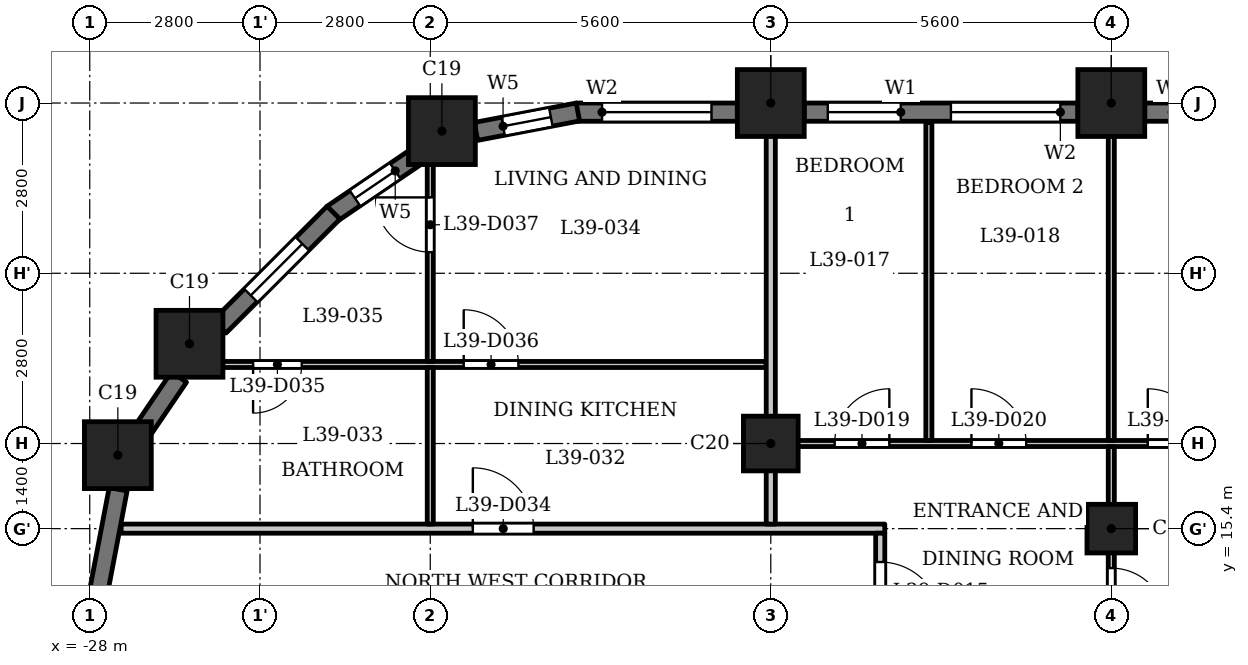
"""IFC4 building model, lengths in metres.
Left out: names, types, materials, properties, quantities, classifications, styles, units other than length and angle.
Written with IfcOpenShell. Run it as: python <this file> out.ifc"""

import sys

from ifc_helpers import new_model, si_unit, direction, frame, frame_2d, origin, origin_2d, place, context, subcontext, project, spatial, rectangle, extrude, element, fill, save


model = new_model("IFC4")
c1 = context("Model", 3, precision=1e-05, world=origin(), true_north=direction((0.0, 1.0)))
c2 = subcontext(c1, "Body", "Model", "MODEL_VIEW")
j1 = project(units=[si_unit("LENGTHUNIT", "METRE"), si_unit("PLANEANGLEUNIT", "RADIAN")], contexts=[c1])
p1 = place(None, origin())
s1 = spatial("IfcSite", under=j1, at=p1, CompositionType="ELEMENT")
p2 = place(p1, origin())
s2 = spatial("IfcBuilding", under=s1, at=p2, CompositionType="ELEMENT")
p3 = place(p2, frame((0.0, 0.0, 153.6)))
s3 = spatial("IfcBuildingStorey", under=s2, at=p3, CompositionType="ELEMENT", Elevation=153.6)
for number, where, z_axis, x_axis in (
    (1, (-11.2, 22.4, 0.0), (0.0, 0.0, 1.0), (1.0, 0.0, 0.0)),
    (2, (-16.8, 22.4, 0.0), (0.0, 0.0, 1.0), (1.0, 0.0, 0.0)),
    (3, (-22.209, 21.938, 0.0), (0.0, 0.0, 1.0), (1.0, 0.0, 0.0)),
    (4, (-26.36, 18.44, 0.0), (0.0, 0.0, 1.0), (1.0, 0.0, 0.0)),
    (5, (-27.538, 16.609, 0.0), (0.0, 0.0, 1.0), (1.0, 0.0, 0.0)),
):
    element("IfcColumn", number, at=place(p3, frame(where, z_axis=z_axis, x_axis=x_axis)), inside=s3, PredefinedType="COLUMN", context=c2, shape_type="SweptSolid", body=[
        extrude(rectangle(XDim=1.1, YDim=1.1, at=origin_2d()), origin(), (0.0, 0.0, 1.0), 3.5),
    ])
p4 = place(p3, frame((-16.8, 16.8, 0.0), z_axis=(0.0, 0.0, 1.0), x_axis=(1.0, 0.0, 0.0)))
e6 = element("IfcColumn", 6, at=p4, inside=s3, PredefinedType="COLUMN", context=c2, shape_type="SweptSolid", body=[
    extrude(rectangle(XDim=0.9, YDim=0.9, at=origin_2d()), origin(), (0.0, 0.0, 1.0), 3.5),
])
p5 = place(p3, frame((-11.2, 15.4, 0.0), z_axis=(0.0, 0.0, 1.0), x_axis=(1.0, 0.0, 0.0)))
e7 = element("IfcColumn", 7, at=p5, inside=s3, PredefinedType="COLUMN", context=c2, shape_type="SweptSolid", body=[
    extrude(rectangle(XDim=0.8, YDim=0.8, at=origin_2d()), origin(), (0.0, 0.0, 1.0), 3.5),
])
p6 = place(p3, frame((-6.15, 22.25, 0.0), z_axis=(0.0, 0.0, 1.0), x_axis=(-1.0, 0.0, 0.0)))
e8 = element("IfcWall", 8, at=p6, inside=s3, PredefinedType="SOLIDWALL", context=c2, shape_type="SweptSolid", body=[
    extrude(rectangle(XDim=4.5, YDim=0.3, at=frame_2d((2.25, 0.0))), origin(), (0.0, 0.0, 1.0), 2.45),
])
p7 = place(p6, frame((0.45, 0.0, 1.2)))
e9 = element("IfcOpeningElement", 9, at=p7, cuts=e8, PredefinedType="OPENING", context=c2, shape_type="SweptSolid", body=[
    extrude(rectangle(XDim=3.6, YDim=0.95, at=frame_2d((1.8, 0.475))), frame((0.0, 0.16, 0.0), z_axis=(0.0, -1.0, 0.0), x_axis=(1.0, 0.0, 0.0)), (0.0, 0.0, 1.0), 0.32),
])
p8 = place(p3, frame((-11.75, 22.25, 0.0), z_axis=(0.0, 0.0, 1.0), x_axis=(-1.0, 0.0, 0.0)))
e10 = element("IfcWall", 10, at=p8, inside=s3, PredefinedType="SOLIDWALL", context=c2, shape_type="SweptSolid", body=[
    extrude(rectangle(XDim=4.5, YDim=0.3, at=frame_2d((2.25, 0.0))), origin(), (0.0, 0.0, 1.0), 2.45),
])
p9 = place(p8, frame((0.288, 0.0, 0.9)))
e11 = element("IfcOpeningElement", 11, at=p9, cuts=e10, PredefinedType="OPENING", context=c2, shape_type="SweptSolid", body=[
    extrude(rectangle(XDim=1.8, YDim=1.25, at=frame_2d((0.9, 0.625))), frame((0.0, 0.16, 0.0), z_axis=(0.0, -1.0, 0.0), x_axis=(1.0, 0.0, 0.0)), (0.0, 0.0, 1.0), 0.32),
])
p10 = place(p8, frame((2.913, 0.0, 0.6)))
e12 = element("IfcOpeningElement", 12, at=p10, cuts=e10, PredefinedType="OPENING", context=c2, shape_type="SweptSolid", body=[
    extrude(rectangle(XDim=1.2, YDim=1.55, at=frame_2d((0.6, 0.775))), frame((0.0, 0.16, 0.0), z_axis=(0.0, -1.0, 0.0), x_axis=(1.0, 0.0, 0.0)), (0.0, 0.0, 1.0), 0.32),
])
p11 = place(p3, frame((-17.35, 22.25, 0.0), z_axis=(0.0, 0.0, 1.0), x_axis=(-1.0, 0.0, 0.0)))
e13 = element("IfcWall", 13, at=p11, inside=s3, PredefinedType="SOLIDWALL", context=c2, shape_type="SweptSolid", body=[
    extrude(rectangle(XDim=2.65, YDim=0.3, at=frame_2d((1.325, 0.0))), origin(), (0.0, 0.0, 1.0), 2.45),
])
p12 = place(p11, frame((0.425, 0.0, 0.9)))
e14 = element("IfcOpeningElement", 14, at=p12, cuts=e13, PredefinedType="OPENING", context=c2, shape_type="SweptSolid", body=[
    extrude(rectangle(XDim=1.8, YDim=1.25, at=frame_2d((0.9, 0.625))), frame((0.0, 0.16, 0.0), z_axis=(0.0, -1.0, 0.0), x_axis=(1.0, 0.0, 0.0)), (0.0, 0.0, 1.0), 0.32),
])
p13 = place(p3, frame((-19.972, 22.253, 0.0), z_axis=(0.0, 0.0, 1.0), x_axis=(-0.982297206936, -0.187329114784, 0.0)))
e15 = element("IfcWall", 15, at=p13, inside=s3, PredefinedType="SOLIDWALL", context=c2, shape_type="SweptSolid", body=[
    extrude(rectangle(XDim=1.706, YDim=0.3, at=frame_2d((0.853, 0.0))), origin(), (0.0, 0.0, 1.0), 2.45),
])
p14 = place(p13, frame((0.453, 0.0, 0.6)))
e16 = element("IfcOpeningElement", 16, at=p14, cuts=e15, PredefinedType="OPENING", context=c2, shape_type="SweptSolid", body=[
    extrude(rectangle(XDim=0.8, YDim=1.55, at=frame_2d((0.4, 0.775))), frame((0.0, 0.16, 0.0), z_axis=(0.0, -1.0, 0.0), x_axis=(1.0, 0.0, 0.0)), (0.0, 0.0, 1.0), 0.32),
])
p15 = place(p3, frame((-22.602, 21.538, 0.0), z_axis=(0.0, 0.0, 1.0), x_axis=(-0.827040942766, -0.562141689424, 0.0)))
e17 = element("IfcWall", 17, at=p15, inside=s3, PredefinedType="SOLIDWALL", context=c2, shape_type="SweptSolid", body=[
    extrude(rectangle(XDim=1.706, YDim=0.3, at=frame_2d((0.853, 0.0))), origin(), (0.0, 0.0, 1.0), 2.45),
])
p16 = place(p15, frame((0.453, 0.0, 0.6)))
e18 = element("IfcOpeningElement", 18, at=p16, cuts=e17, PredefinedType="OPENING", context=c2, shape_type="SweptSolid", body=[
    extrude(rectangle(XDim=0.8, YDim=1.55, at=frame_2d((0.4, 0.775))), frame((0.0, 0.16, 0.0), z_axis=(0.0, -1.0, 0.0), x_axis=(1.0, 0.0, 0.0)), (0.0, 0.0, 1.0), 0.32),
])
p17 = place(p3, frame((-23.991, 20.597, 0.0), z_axis=(0.0, 0.0, 1.0), x_axis=(-0.707106781187, -0.707106781187, 0.0)))
e19 = element("IfcWall", 19, at=p17, inside=s3, PredefinedType="SOLIDWALL", context=c2, shape_type="SweptSolid", body=[
    extrude(rectangle(XDim=2.65, YDim=0.3, at=frame_2d((1.325, 0.0))), origin(), (0.0, 0.0, 1.0), 2.45),
])
p18 = place(p17, frame((0.725, 0.0, 0.6)))
e20 = element("IfcOpeningElement", 20, at=p18, cuts=e19, PredefinedType="OPENING", context=c2, shape_type="SweptSolid", body=[
    extrude(rectangle(XDim=1.2, YDim=1.55, at=frame_2d((0.6, 0.775))), frame((0.0, 0.16, 0.0), z_axis=(0.0, -1.0, 0.0), x_axis=(1.0, 0.0, 0.0)), (0.0, 0.0, 1.0), 0.32),
])
p19 = place(p3, frame((-26.532, 17.893, 0.0), z_axis=(0.0, 0.0, 1.0), x_axis=(-0.562105419172, -0.82706559458, 0.0)))
e21 = element("IfcWall", 21, at=p19, inside=s3, PredefinedType="SOLIDWALL", context=c2, shape_type="SweptSolid", body=[
    extrude(rectangle(XDim=1.077, YDim=0.3, at=frame_2d((0.539, 0.0))), origin(), (0.0, 0.0, 1.0), 3.2),
])
p20 = place(p3, frame((-27.533, 16.048, 0.0), z_axis=(0.0, 0.0, 1.0), x_axis=(-0.187302784601, -0.982302227871, 0.0)))
e22 = element("IfcWall", 22, at=p20, inside=s3, PredefinedType="SOLIDWALL", context=c2, shape_type="SweptSolid", body=[
    extrude(rectangle(XDim=1.706, YDim=0.3, at=frame_2d((0.853, 0.0))), origin(), (0.0, 0.0, 1.0), 2.45),
])
p21 = place(p3, frame((-27.484, 15.4, 0.0), z_axis=(0.0, 0.0, 1.0), x_axis=(1.0, 0.0, 0.0)))
e23 = element("IfcWall", 23, at=p21, inside=s3, PredefinedType="PARTITIONING", context=c2, shape_type="SweptSolid", body=[
    extrude(rectangle(XDim=12.559, YDim=0.15, at=frame_2d((6.279, 0.0))), origin(), (0.0, 0.0, 1.0), 3.2),
])
p22 = place(p21, frame((5.784, 0.0, 0.0)))
e24 = element("IfcOpeningElement", 24, at=p22, cuts=e23, PredefinedType="OPENING", context=c2, shape_type="SweptSolid", body=[
    extrude(rectangle(XDim=1.0, YDim=2.1, at=frame_2d((0.5, 1.05))), frame((0.0, 0.085, 0.0), z_axis=(0.0, -1.0, 0.0), x_axis=(1.0, 0.0, 0.0)), (0.0, 0.0, 1.0), 0.17),
])
p23 = place(p3, frame((-16.725, 16.8, 0.0), z_axis=(0.0, 0.0, 1.0), x_axis=(1.0, 0.0, 0.0)))
e25 = element("IfcWall", 25, at=p23, inside=s3, PredefinedType="PARTITIONING", context=c2, shape_type="SweptSolid", body=[
    extrude(rectangle(XDim=33.45, YDim=0.1, at=frame_2d((16.725, 0.0))), origin(), (0.0, 0.0, 1.0), 3.2),
])
p24 = place(p23, frame((9.575, 0.0, 0.0)))
e26 = element("IfcOpeningElement", 26, at=p24, cuts=e25, PredefinedType="OPENING", context=c2, shape_type="SweptSolid", body=[
    extrude(rectangle(XDim=0.8, YDim=2.1, at=frame_2d((0.4, 1.05))), frame((0.0, 0.06, 0.0), z_axis=(0.0, -1.0, 0.0), x_axis=(1.0, 0.0, 0.0)), (0.0, 0.0, 1.0), 0.12),
])
p25 = place(p23, frame((6.125, 0.0, 0.0)))
e27 = element("IfcOpeningElement", 27, at=p25, cuts=e25, PredefinedType="OPENING", context=c2, shape_type="SweptSolid", body=[
    extrude(rectangle(XDim=0.9, YDim=2.1, at=frame_2d((0.45, 1.05))), frame((0.0, 0.06, 0.0), z_axis=(0.0, -1.0, 0.0), x_axis=(1.0, 0.0, 0.0)), (0.0, 0.0, 1.0), 0.12),
])
p26 = place(p23, frame((0.975, 0.0, 0.0)))
e28 = element("IfcOpeningElement", 28, at=p26, cuts=e25, PredefinedType="OPENING", context=c2, shape_type="SweptSolid", body=[
    extrude(rectangle(XDim=0.9, YDim=2.1, at=frame_2d((0.45, 1.05))), frame((0.0, 0.06, 0.0), z_axis=(0.0, -1.0, 0.0), x_axis=(1.0, 0.0, 0.0)), (0.0, 0.0, 1.0), 0.12),
])
p27 = place(p23, frame((3.225, 0.0, 0.0)))
e29 = element("IfcOpeningElement", 29, at=p27, cuts=e25, PredefinedType="OPENING", context=c2, shape_type="SweptSolid", body=[
    extrude(rectangle(XDim=0.9, YDim=2.1, at=frame_2d((0.45, 1.05))), frame((0.0, 0.06, 0.0), z_axis=(0.0, -1.0, 0.0), x_axis=(1.0, 0.0, 0.0)), (0.0, 0.0, 1.0), 0.12),
])
p28 = place(p23, frame((15.375, 0.0, 0.0)))
e30 = element("IfcOpeningElement", 30, at=p28, cuts=e25, PredefinedType="OPENING", context=c2, shape_type="SweptSolid", body=[
    extrude(rectangle(XDim=0.8, YDim=2.1, at=frame_2d((0.4, 1.05))), frame((0.0, 0.06, 0.0), z_axis=(0.0, -1.0, 0.0), x_axis=(1.0, 0.0, 0.0)), (0.0, 0.0, 1.0), 0.12),
])
p29 = place(p23, frame((13.175, 0.0, 0.0)))
e31 = element("IfcOpeningElement", 31, at=p29, cuts=e25, PredefinedType="OPENING", context=c2, shape_type="SweptSolid", body=[
    extrude(rectangle(XDim=0.9, YDim=2.1, at=frame_2d((0.45, 1.05))), frame((0.0, 0.06, 0.0), z_axis=(0.0, -1.0, 0.0), x_axis=(1.0, 0.0, 0.0)), (0.0, 0.0, 1.0), 0.12),
])
p30 = place(p23, frame((31.975, 0.0, 0.0)))
e32 = element("IfcOpeningElement", 32, at=p30, cuts=e25, PredefinedType="OPENING", context=c2, shape_type="SweptSolid", body=[
    extrude(rectangle(XDim=0.9, YDim=2.1, at=frame_2d((0.45, 1.05))), frame((0.0, 0.06, 0.0), z_axis=(0.0, -1.0, 0.0), x_axis=(1.0, 0.0, 0.0)), (0.0, 0.0, 1.0), 0.12),
])
p31 = place(p23, frame((22.875, 0.0, 0.0)))
e33 = element("IfcOpeningElement", 33, at=p31, cuts=e25, PredefinedType="OPENING", context=c2, shape_type="SweptSolid", body=[
    extrude(rectangle(XDim=0.9, YDim=2.1, at=frame_2d((0.45, 1.05))), frame((0.0, 0.06, 0.0), z_axis=(0.0, -1.0, 0.0), x_axis=(1.0, 0.0, 0.0)), (0.0, 0.0, 1.0), 0.12),
])
p32 = place(p3, frame((-26.44, 18.1, 0.0), z_axis=(0.0, 0.0, 1.0), x_axis=(1.0, 0.0, 0.0)))
e34 = element("IfcWall", 34, at=p32, inside=s3, PredefinedType="PARTITIONING", context=c2, shape_type="SweptSolid", body=[
    extrude(rectangle(XDim=9.565, YDim=0.1, at=frame_2d((4.782, 0.0))), origin(), (0.0, 0.0, 1.0), 3.2),
])
p33 = place(p32, frame((1.126, 0.0, 0.0)))
e35 = element("IfcOpeningElement", 35, at=p33, cuts=e34, PredefinedType="OPENING", context=c2, shape_type="SweptSolid", body=[
    extrude(rectangle(XDim=0.8, YDim=2.1, at=frame_2d((0.4, 1.05))), frame((0.0, 0.06, 0.0), z_axis=(0.0, -1.0, 0.0), x_axis=(1.0, 0.0, 0.0)), (0.0, 0.0, 1.0), 0.12),
])
p34 = place(p32, frame((4.59, 0.0, 0.0)))
e36 = element("IfcOpeningElement", 36, at=p34, cuts=e34, PredefinedType="OPENING", context=c2, shape_type="SweptSolid", body=[
    extrude(rectangle(XDim=0.9, YDim=2.1, at=frame_2d((0.45, 1.05))), frame((0.0, 0.06, 0.0), z_axis=(0.0, -1.0, 0.0), x_axis=(1.0, 0.0, 0.0)), (0.0, 0.0, 1.0), 0.12),
])
p35 = place(p3, frame((-22.4, 15.475, 0.0), z_axis=(0.0, 0.0, 1.0), x_axis=(0.0, 1.0, 0.0)))
e37 = element("IfcWall", 37, at=p35, inside=s3, PredefinedType="PARTITIONING", context=c2, shape_type="SweptSolid", body=[
    extrude(rectangle(XDim=2.575, YDim=0.1, at=frame_2d((1.288, 0.0))), origin(), (0.0, 0.0, 1.0), 3.2),
])
p36 = place(p3, frame((-22.4, 18.15, 0.0), z_axis=(0.0, 0.0, 1.0), x_axis=(0.0, 1.0, 0.0)))
e38 = element("IfcWall", 38, at=p36, inside=s3, PredefinedType="PARTITIONING", context=c2, shape_type="SweptSolid", body=[
    extrude(rectangle(XDim=3.57, YDim=0.1, at=frame_2d((1.785, 0.0))), origin(), (0.0, 0.0, 1.0), 3.2),
])
p37 = place(p36, frame((1.798, 0.0, 0.0)))
e39 = element("IfcOpeningElement", 39, at=p37, cuts=e38, PredefinedType="OPENING", context=c2, shape_type="SweptSolid", body=[
    extrude(rectangle(XDim=0.9, YDim=2.1, at=frame_2d((0.45, 1.05))), frame((0.0, 0.06, 0.0), z_axis=(0.0, -1.0, 0.0), x_axis=(1.0, 0.0, 0.0)), (0.0, 0.0, 1.0), 0.12),
])
p38 = place(p3, frame((-16.8, 15.475, 0.0), z_axis=(0.0, 0.0, 1.0), x_axis=(0.0, 1.0, 0.0)))
e40 = element("IfcWall", 40, at=p38, inside=s3, PredefinedType="PARTITIONING", context=c2, shape_type="SweptSolid", body=[
    extrude(rectangle(XDim=7.455, YDim=0.15, at=frame_2d((3.728, 0.0))), origin(), (0.0, 0.0, 1.0), 3.2),
])
p39 = place(p3, frame((-15.0, 13.275, 0.0), z_axis=(0.0, 0.0, 1.0), x_axis=(0.0, 1.0, 0.0)))
e41 = element("IfcWall", 41, at=p39, inside=s3, PredefinedType="PARTITIONING", context=c2, shape_type="SweptSolid", body=[
    extrude(rectangle(XDim=2.05, YDim=0.15, at=frame_2d((1.025, 0.0))), origin(), (0.0, 0.0, 1.0), 3.2),
])
p40 = place(p39, frame((0.576, 0.0, 0.0)))
e42 = element("IfcOpeningElement", 42, at=p40, cuts=e41, PredefinedType="OPENING", context=c2, shape_type="SweptSolid", body=[
    extrude(rectangle(XDim=1.0, YDim=2.1, at=frame_2d((0.5, 1.05))), frame((0.0, 0.085, 0.0), z_axis=(0.0, -1.0, 0.0), x_axis=(1.0, 0.0, 0.0)), (0.0, 0.0, 1.0), 0.17),
])
p41 = place(p3, frame((-14.2, 16.85, 0.0), z_axis=(0.0, 0.0, 1.0), x_axis=(0.0, 1.0, 0.0)))
e43 = element("IfcWall", 43, at=p41, inside=s3, PredefinedType="PARTITIONING", context=c2, shape_type="SweptSolid", body=[
    extrude(rectangle(XDim=5.23, YDim=0.1, at=frame_2d((2.615, 0.0))), origin(), (0.0, 0.0, 1.0), 3.2),
])
p42 = place(p3, frame((-11.2, 13.275, 0.0), z_axis=(0.0, 0.0, 1.0), x_axis=(0.0, 1.0, 0.0)))
e44 = element("IfcWall", 44, at=p42, inside=s3, PredefinedType="PARTITIONING", context=c2, shape_type="SweptSolid", body=[
    extrude(rectangle(XDim=3.475, YDim=0.1, at=frame_2d((1.738, 0.0))), origin(), (0.0, 0.0, 1.0), 3.2),
])
p43 = place(p42, frame((0.576, 0.0, 0.0)))
e45 = element("IfcOpeningElement", 45, at=p43, cuts=e44, PredefinedType="OPENING", context=c2, shape_type="SweptSolid", body=[
    extrude(rectangle(XDim=0.9, YDim=2.1, at=frame_2d((0.45, 1.05))), frame((0.0, 0.06, 0.0), z_axis=(0.0, -1.0, 0.0), x_axis=(1.0, 0.0, 0.0)), (0.0, 0.0, 1.0), 0.12),
])
p44 = place(p3, frame((-11.2, 16.85, 0.0), z_axis=(0.0, 0.0, 1.0), x_axis=(0.0, 1.0, 0.0)))
e46 = element("IfcWall", 46, at=p44, inside=s3, PredefinedType="PARTITIONING", context=c2, shape_type="SweptSolid", body=[
    extrude(rectangle(XDim=6.08, YDim=0.1, at=frame_2d((3.04, 0.0))), origin(), (0.0, 0.0, 1.0), 3.2),
])
p45 = place(p40, origin())
e47 = element("IfcDoor", 47, at=p45, inside=s3, OperationType="SINGLE_SWING_LEFT", PredefinedType="DOOR", context=c2, shape_type="SweptSolid", body=[
    extrude(rectangle(XDim=1.0, YDim=2.1, at=frame_2d((0.5, 1.05))), frame((0.0, 0.025, 0.0), z_axis=(0.0, -1.0, 0.0), x_axis=(1.0, 0.0, 0.0)), (0.0, 0.0, 1.0), 0.05),
])
fill(e42, e47)
p46 = place(p43, origin())
e48 = element("IfcDoor", 48, at=p46, inside=s3, OperationType="SINGLE_SWING_LEFT", PredefinedType="DOOR", context=c2, shape_type="SweptSolid", body=[
    extrude(rectangle(XDim=0.9, YDim=2.1, at=frame_2d((0.45, 1.05))), frame((0.0, 0.025, 0.0), z_axis=(0.0, -1.0, 0.0), x_axis=(1.0, 0.0, 0.0)), (0.0, 0.0, 1.0), 0.05),
])
fill(e45, e48)
p47 = place(p25, origin())
e49 = element("IfcDoor", 49, at=p47, inside=s3, OperationType="SINGLE_SWING_RIGHT", PredefinedType="DOOR", context=c2, shape_type="SweptSolid", body=[
    extrude(rectangle(XDim=0.9, YDim=2.1, at=frame_2d((0.45, 1.05))), frame((0.0, 0.025, 0.0), z_axis=(0.0, -1.0, 0.0), x_axis=(1.0, 0.0, 0.0)), (0.0, 0.0, 1.0), 0.05),
])
fill(e27, e49)
p48 = place(p26, origin())
e50 = element("IfcDoor", 50, at=p48, inside=s3, OperationType="SINGLE_SWING_LEFT", PredefinedType="DOOR", context=c2, shape_type="SweptSolid", body=[
    extrude(rectangle(XDim=0.9, YDim=2.1, at=frame_2d((0.45, 1.05))), frame((0.0, 0.025, 0.0), z_axis=(0.0, -1.0, 0.0), x_axis=(1.0, 0.0, 0.0)), (0.0, 0.0, 1.0), 0.05),
])
fill(e28, e50)
p49 = place(p27, origin())
e51 = element("IfcDoor", 51, at=p49, inside=s3, OperationType="SINGLE_SWING_RIGHT", PredefinedType="DOOR", context=c2, shape_type="SweptSolid", body=[
    extrude(rectangle(XDim=0.9, YDim=2.1, at=frame_2d((0.45, 1.05))), frame((0.0, 0.025, 0.0), z_axis=(0.0, -1.0, 0.0), x_axis=(1.0, 0.0, 0.0)), (0.0, 0.0, 1.0), 0.05),
])
fill(e29, e51)
p50 = place(p22, origin())
e52 = element("IfcDoor", 52, at=p50, inside=s3, OperationType="SINGLE_SWING_RIGHT", PredefinedType="DOOR", context=c2, shape_type="SweptSolid", body=[
    extrude(rectangle(XDim=1.0, YDim=2.1, at=frame_2d((0.5, 1.05))), frame((0.0, 0.025, 0.0), z_axis=(0.0, -1.0, 0.0), x_axis=(1.0, 0.0, 0.0)), (0.0, 0.0, 1.0), 0.05),
])
fill(e24, e52)
p51 = place(p33, origin())
e53 = element("IfcDoor", 53, at=p51, inside=s3, OperationType="SINGLE_SWING_LEFT", PredefinedType="DOOR", context=c2, shape_type="SweptSolid", body=[
    extrude(rectangle(XDim=0.8, YDim=2.1, at=frame_2d((0.4, 1.05))), frame((0.0, 0.025, 0.0), z_axis=(0.0, -1.0, 0.0), x_axis=(1.0, 0.0, 0.0)), (0.0, 0.0, 1.0), 0.05),
])
fill(e35, e53)
p52 = place(p34, origin())
e54 = element("IfcDoor", 54, at=p52, inside=s3, OperationType="SINGLE_SWING_RIGHT", PredefinedType="DOOR", context=c2, shape_type="SweptSolid", body=[
    extrude(rectangle(XDim=0.9, YDim=2.1, at=frame_2d((0.45, 1.05))), frame((0.0, 0.025, 0.0), z_axis=(0.0, -1.0, 0.0), x_axis=(1.0, 0.0, 0.0)), (0.0, 0.0, 1.0), 0.05),
])
fill(e36, e54)
p53 = place(p37, origin())
e55 = element("IfcDoor", 55, at=p53, inside=s3, OperationType="SINGLE_SWING_LEFT", PredefinedType="DOOR", context=c2, shape_type="SweptSolid", body=[
    extrude(rectangle(XDim=0.9, YDim=2.1, at=frame_2d((0.45, 1.05))), frame((0.0, 0.025, 0.0), z_axis=(0.0, -1.0, 0.0), x_axis=(1.0, 0.0, 0.0)), (0.0, 0.0, 1.0), 0.05),
])
fill(e39, e55)
p54 = place(p9, origin())
e56 = element("IfcWindow", 56, at=p54, inside=s3, PartitioningType="SINGLE_PANEL", PredefinedType="WINDOW", context=c2, shape_type="SweptSolid", body=[
    extrude(rectangle(XDim=1.8, YDim=1.25, at=frame_2d((0.9, 0.625))), frame((0.0, 0.03, 0.0), z_axis=(0.0, -1.0, 0.0), x_axis=(1.0, 0.0, 0.0)), (0.0, 0.0, 1.0), 0.06),
])
fill(e11, e56)
p55 = place(p10, origin())
e57 = element("IfcWindow", 57, at=p55, inside=s3, PartitioningType="SINGLE_PANEL", PredefinedType="WINDOW", context=c2, shape_type="SweptSolid", body=[
    extrude(rectangle(XDim=1.2, YDim=1.55, at=frame_2d((0.6, 0.775))), frame((0.0, 0.03, 0.0), z_axis=(0.0, -1.0, 0.0), x_axis=(1.0, 0.0, 0.0)), (0.0, 0.0, 1.0), 0.06),
])
fill(e12, e57)
p56 = place(p12, origin())
e58 = element("IfcWindow", 58, at=p56, inside=s3, PartitioningType="SINGLE_PANEL", PredefinedType="WINDOW", context=c2, shape_type="SweptSolid", body=[
    extrude(rectangle(XDim=1.8, YDim=1.25, at=frame_2d((0.9, 0.625))), frame((0.0, 0.03, 0.0), z_axis=(0.0, -1.0, 0.0), x_axis=(1.0, 0.0, 0.0)), (0.0, 0.0, 1.0), 0.06),
])
fill(e14, e58)
p57 = place(p14, origin())
e59 = element("IfcWindow", 59, at=p57, inside=s3, PartitioningType="SINGLE_PANEL", PredefinedType="WINDOW", context=c2, shape_type="SweptSolid", body=[
    extrude(rectangle(XDim=0.8, YDim=1.55, at=frame_2d((0.4, 0.775))), frame((0.0, 0.03, 0.0), z_axis=(0.0, -1.0, 0.0), x_axis=(1.0, 0.0, 0.0)), (0.0, 0.0, 1.0), 0.06),
])
fill(e16, e59)
p58 = place(p16, origin())
e60 = element("IfcWindow", 60, at=p58, inside=s3, PartitioningType="SINGLE_PANEL", PredefinedType="WINDOW", context=c2, shape_type="SweptSolid", body=[
    extrude(rectangle(XDim=0.8, YDim=1.55, at=frame_2d((0.4, 0.775))), frame((0.0, 0.03, 0.0), z_axis=(0.0, -1.0, 0.0), x_axis=(1.0, 0.0, 0.0)), (0.0, 0.0, 1.0), 0.06),
])
fill(e18, e60)
p59 = place(p18, origin())
e61 = element("IfcWindow", 61, at=p59, inside=s3, PartitioningType="SINGLE_PANEL", PredefinedType="WINDOW", context=c2, shape_type="SweptSolid", body=[
    extrude(rectangle(XDim=1.2, YDim=1.55, at=frame_2d((0.6, 0.775))), frame((0.0, 0.03, 0.0), z_axis=(0.0, -1.0, 0.0), x_axis=(1.0, 0.0, 0.0)), (0.0, 0.0, 1.0), 0.06),
])
fill(e20, e61)
save(model, sys.argv[1])
